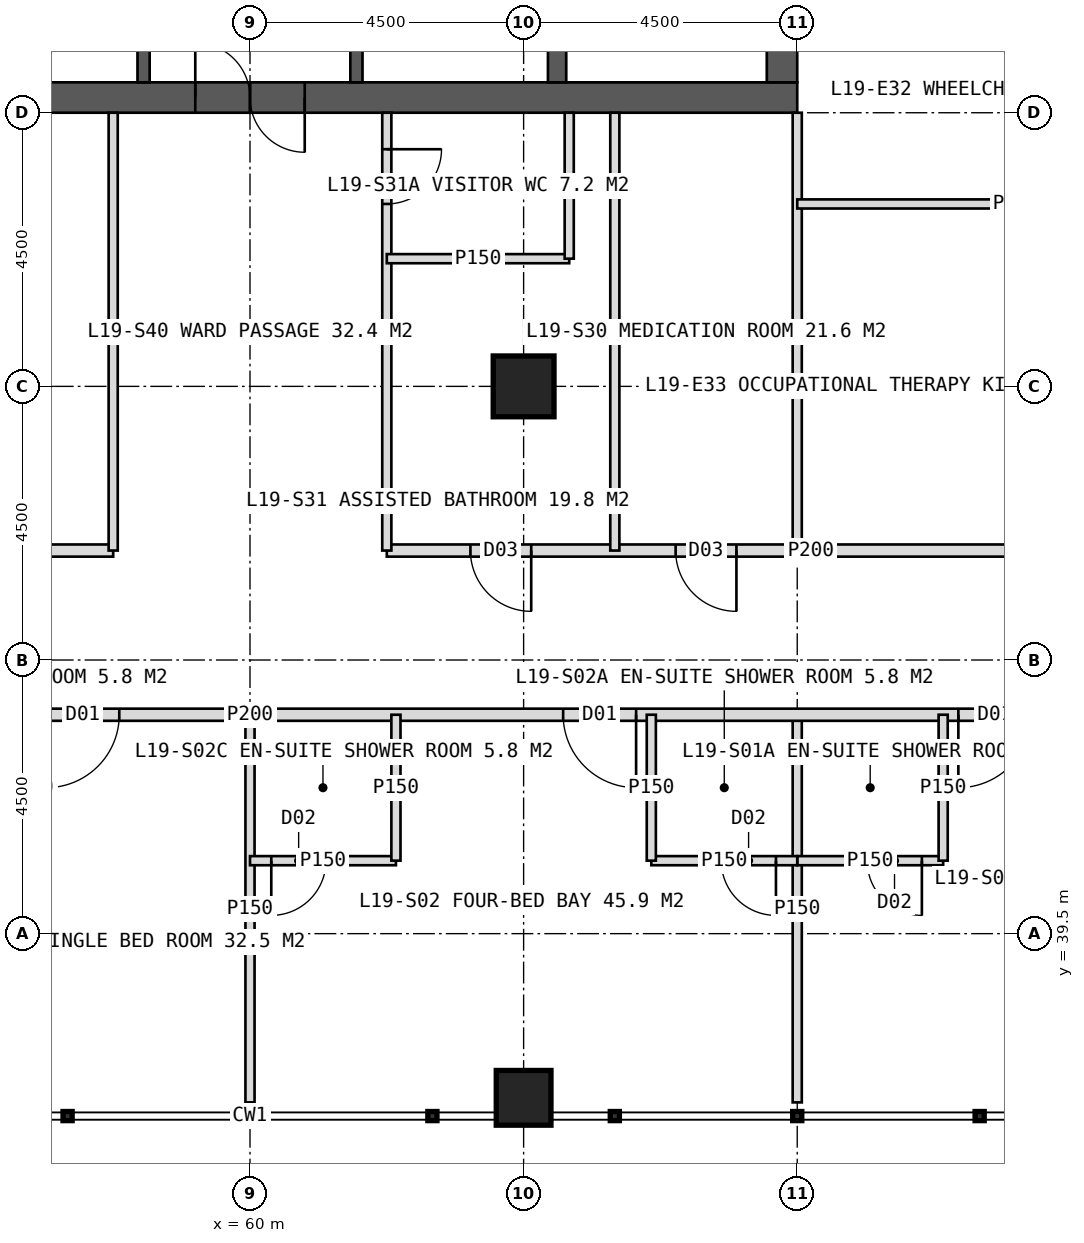
"""IFC4 building model, lengths in metres.
Left out: names, types, materials, properties, quantities, classifications, styles, units other than length and angle.
Written with IfcOpenShell. Run it as: python <this file> out.ifc"""

import sys

from ifc_helpers import new_model, si_unit, direction, frame, frame_2d, origin, origin_2d, place, context, subcontext, project, spatial, rectangle, hollow_rectangle, extrude, element, fill, save


model = new_model("IFC4")
c1 = context("Model", 3, precision=1e-05, world=origin(), true_north=direction((0.0, 1.0)))
c2 = subcontext(c1, "Body", "Model", "MODEL_VIEW")
j1 = project(units=[si_unit("LENGTHUNIT", "METRE"), si_unit("PLANEANGLEUNIT", "RADIAN")], contexts=[c1])
p1 = place(None, origin())
s1 = spatial("IfcSite", under=j1, at=p1, CompositionType="ELEMENT")
p2 = place(p1, origin())
s2 = spatial("IfcBuilding", under=s1, at=p2, CompositionType="ELEMENT")
p3 = place(p2, frame((0.0, 0.0, 83.0)))
s3 = spatial("IfcBuildingStorey", under=s2, at=p3, CompositionType="ELEMENT", Elevation=83.0)
p4 = place(p3, frame((51.0, 53.25, 0.0), z_axis=(0.0, 0.0, 1.0), x_axis=(1.0, 0.0, 0.0)))
e1 = element("IfcWall", 1, at=p4, inside=s3, PredefinedType="SHEAR", context=c2, shape_type="SweptSolid", body=[
    extrude(rectangle(XDim=18.0, YDim=0.5, at=frame_2d((9.0, 0.0))), origin(), (0.0, 0.0, 1.0), 4.0),
])
p5 = place(p4, frame((8.1, 0.0, 0.0)))
e2 = element("IfcOpeningElement", 2, at=p5, cuts=e1, PredefinedType="OPENING", context=c2, shape_type="SweptSolid", body=[
    extrude(rectangle(XDim=1.8, YDim=2.2, at=frame_2d((0.9, 1.1))), frame((0.0, 0.26, 0.0), z_axis=(0.0, -1.0, 0.0), x_axis=(1.0, 0.0, 0.0)), (0.0, 0.0, 1.0), 0.52),
])
p6 = place(p3, frame((68.75, 53.5, 0.0), z_axis=(0.0, 0.0, 1.0), x_axis=(0.0, 1.0, 0.0)))
e3 = element("IfcWall", 3, at=p6, inside=s3, PredefinedType="SHEAR", context=c2, shape_type="SweptSolid", body=[
    extrude(rectangle(XDim=17.0, YDim=0.5, at=frame_2d((8.5, 0.0))), origin(), (0.0, 0.0, 1.0), 4.0),
])
p7 = place(p6, frame((9.5, 0.0, 0.0)))
e4 = element("IfcOpeningElement", 4, at=p7, cuts=e3, PredefinedType="OPENING", context=c2, shape_type="SweptSolid", body=[
    extrude(rectangle(XDim=1.5, YDim=2.2, at=frame_2d((0.75, 1.1))), frame((0.0, 0.26, 0.0), z_axis=(0.0, -1.0, 0.0), x_axis=(1.0, 0.0, 0.0)), (0.0, 0.0, 1.0), 0.52),
])
p8 = place(p3, frame((65.05, 53.5, 0.0), z_axis=(0.0, 0.0, 1.0), x_axis=(0.0, 1.0, 0.0)))
e5 = element("IfcWall", 5, at=p8, inside=s3, PredefinedType="SHEAR", context=c2, shape_type="SweptSolid", body=[
    extrude(rectangle(XDim=17.0, YDim=0.3, at=frame_2d((8.5, 0.0))), origin(), (0.0, 0.0, 1.0), 4.0),
])
p9 = place(p3, frame((58.25, 53.5, 0.0), z_axis=(0.0, 0.0, 1.0), x_axis=(0.0, 1.0, 0.0)))
e6 = element("IfcWall", 6, at=p9, inside=s3, PredefinedType="SHEAR", context=c2, shape_type="SweptSolid", body=[
    extrude(rectangle(XDim=17.0, YDim=0.2, at=frame_2d((8.5, 0.0))), origin(), (0.0, 0.0, 1.0), 4.0),
])
p10 = place(p9, frame((1.375, 0.0, 0.0)))
e7 = element("IfcOpeningElement", 7, at=p10, cuts=e6, PredefinedType="OPENING", context=c2, shape_type="SweptSolid", body=[
    extrude(rectangle(XDim=1.4, YDim=2.2, at=frame_2d((0.7, 1.1))), frame((0.0, 0.11, 0.0), z_axis=(0.0, -1.0, 0.0), x_axis=(1.0, 0.0, 0.0)), (0.0, 0.0, 1.0), 0.22),
])
p11 = place(p9, frame((5.675, 0.0, 0.0)))
e8 = element("IfcOpeningElement", 8, at=p11, cuts=e6, PredefinedType="OPENING", context=c2, shape_type="SweptSolid", body=[
    extrude(rectangle(XDim=1.4, YDim=2.2, at=frame_2d((0.7, 1.1))), frame((0.0, 0.11, 0.0), z_axis=(0.0, -1.0, 0.0), x_axis=(1.0, 0.0, 0.0)), (0.0, 0.0, 1.0), 0.22),
])
p12 = place(p3, frame((61.75, 53.5, 0.0), z_axis=(0.0, 0.0, 1.0), x_axis=(0.0, 1.0, 0.0)))
e9 = element("IfcWall", 9, at=p12, inside=s3, PredefinedType="SHEAR", context=c2, shape_type="SweptSolid", body=[
    extrude(rectangle(XDim=17.0, YDim=0.2, at=frame_2d((8.5, 0.0))), origin(), (0.0, 0.0, 1.0), 4.0),
])
p13 = place(p12, frame((1.375, 0.0, 0.0)))
e10 = element("IfcOpeningElement", 10, at=p13, cuts=e9, PredefinedType="OPENING", context=c2, shape_type="SweptSolid", body=[
    extrude(rectangle(XDim=1.4, YDim=2.2, at=frame_2d((0.7, 1.1))), frame((0.0, 0.11, 0.0), z_axis=(0.0, -1.0, 0.0), x_axis=(1.0, 0.0, 0.0)), (0.0, 0.0, 1.0), 0.22),
])
p14 = place(p12, frame((5.675, 0.0, 0.0)))
e11 = element("IfcOpeningElement", 11, at=p14, cuts=e9, PredefinedType="OPENING", context=c2, shape_type="SweptSolid", body=[
    extrude(rectangle(XDim=1.4, YDim=2.2, at=frame_2d((0.7, 1.1))), frame((0.0, 0.11, 0.0), z_axis=(0.0, -1.0, 0.0), x_axis=(1.0, 0.0, 0.0)), (0.0, 0.0, 1.0), 0.22),
])
p15 = place(p3, frame((64.5, 48.5, 0.0), z_axis=(0.0, 0.0, 1.0), x_axis=(1.0, 0.0, 0.0)))
e12 = element("IfcColumn", 12, at=p15, inside=s3, PredefinedType="COLUMN", context=c2, shape_type="SweptSolid", body=[
    extrude(hollow_rectangle(XDim=1.0, YDim=1.0, WallThickness=0.1, at=origin_2d()), origin(), (0.0, 0.0, 1.0), 4.0),
])
p16 = place(p3, frame((64.5, 36.8, 0.0), z_axis=(0.0, 0.0, 1.0), x_axis=(1.0, 0.0, 0.0)))
e13 = element("IfcColumn", 13, at=p16, inside=s3, PredefinedType="COLUMN", context=c2, shape_type="SweptSolid", body=[
    extrude(hollow_rectangle(XDim=0.9, YDim=0.9, WallThickness=0.08, at=origin_2d()), origin(), (0.0, 0.0, 1.0), 4.0),
])
p17 = place(p3, frame((69.0, 43.1, 0.0), z_axis=(0.0, 0.0, 1.0), x_axis=(0.0, -1.0, 0.0)))
e14 = element("IfcWall", 14, at=p17, inside=s3, PredefinedType="PARTITIONING", context=c2, shape_type="SweptSolid", body=[
    extrude(rectangle(XDim=6.375, YDim=0.15, at=frame_2d((3.188, 0.0))), origin(), (0.0, 0.0, 1.0), 3.75),
])
p18 = place(p3, frame((60.0, 43.1, 0.0), z_axis=(0.0, 0.0, 1.0), x_axis=(0.0, -1.0, 0.0)))
e15 = element("IfcWall", 15, at=p18, inside=s3, PredefinedType="PARTITIONING", context=c2, shape_type="SweptSolid", body=[
    extrude(rectangle(XDim=6.375, YDim=0.15, at=frame_2d((3.188, 0.0))), origin(), (0.0, 0.0, 1.0), 2.75),
])
p19 = place(p3, frame((78.9, 43.1, 0.0), z_axis=(0.0, 0.0, 1.0), x_axis=(-1.0, 0.0, 0.0)))
e16 = element("IfcWall", 16, at=p19, inside=s3, PredefinedType="PARTITIONING", context=c2, shape_type="SweptSolid", body=[
    extrude(rectangle(XDim=37.8, YDim=0.2, at=frame_2d((18.9, 0.0))), origin(), (0.0, 0.0, 1.0), 3.75),
])
p20 = place(p19, frame((6.05, 0.0, 0.0)))
e17 = element("IfcOpeningElement", 17, at=p20, cuts=e16, PredefinedType="OPENING", context=c2, shape_type="SweptSolid", body=[
    extrude(rectangle(XDim=1.2, YDim=2.2, at=frame_2d((0.6, 1.1))), frame((0.0, 0.11, 0.0), z_axis=(0.0, -1.0, 0.0), x_axis=(1.0, 0.0, 0.0)), (0.0, 0.0, 1.0), 0.22),
])
p21 = place(p19, frame((12.55, 0.0, 0.0)))
e18 = element("IfcOpeningElement", 18, at=p21, cuts=e16, PredefinedType="OPENING", context=c2, shape_type="SweptSolid", body=[
    extrude(rectangle(XDim=1.2, YDim=2.2, at=frame_2d((0.6, 1.1))), frame((0.0, 0.11, 0.0), z_axis=(0.0, -1.0, 0.0), x_axis=(1.0, 0.0, 0.0)), (0.0, 0.0, 1.0), 0.22),
])
p22 = place(p19, frame((21.05, 0.0, 0.0)))
e19 = element("IfcOpeningElement", 19, at=p22, cuts=e16, PredefinedType="OPENING", context=c2, shape_type="SweptSolid", body=[
    extrude(rectangle(XDim=1.2, YDim=2.2, at=frame_2d((0.6, 1.1))), frame((0.0, 0.11, 0.0), z_axis=(0.0, -1.0, 0.0), x_axis=(1.0, 0.0, 0.0)), (0.0, 0.0, 1.0), 0.22),
])
p23 = place(p19, frame((27.55, 0.0, 0.0)))
e20 = element("IfcOpeningElement", 20, at=p23, cuts=e16, PredefinedType="OPENING", context=c2, shape_type="SweptSolid", body=[
    extrude(rectangle(XDim=1.2, YDim=2.2, at=frame_2d((0.6, 1.1))), frame((0.0, 0.11, 0.0), z_axis=(0.0, -1.0, 0.0), x_axis=(1.0, 0.0, 0.0)), (0.0, 0.0, 1.0), 0.22),
])
p24 = place(p3, frame((71.4, 40.7, 0.0), z_axis=(0.0, 0.0, 1.0), x_axis=(-1.0, 0.0, 0.0)))
e21 = element("IfcWall", 21, at=p24, inside=s3, PredefinedType="PARTITIONING", context=c2, shape_type="SweptSolid", body=[
    extrude(rectangle(XDim=2.4, YDim=0.15, at=frame_2d((1.2, 0.0))), origin(), (0.0, 0.0, 1.0), 3.75),
])
p25 = place(p24, frame((0.35, 0.0, 0.0)))
e22 = element("IfcOpeningElement", 22, at=p25, cuts=e21, PredefinedType="OPENING", context=c2, shape_type="SweptSolid", body=[
    extrude(rectangle(XDim=0.9, YDim=2.1, at=frame_2d((0.45, 1.05))), frame((0.0, 0.085, 0.0), z_axis=(0.0, -1.0, 0.0), x_axis=(1.0, 0.0, 0.0)), (0.0, 0.0, 1.0), 0.17),
])
p26 = place(p3, frame((71.4, 43.1, 0.0), z_axis=(0.0, 0.0, 1.0), x_axis=(0.0, -1.0, 0.0)))
e23 = element("IfcWall", 23, at=p26, inside=s3, PredefinedType="PARTITIONING", context=c2, shape_type="SweptSolid", body=[
    extrude(rectangle(XDim=2.4, YDim=0.15, at=frame_2d((1.2, 0.0))), origin(), (0.0, 0.0, 1.0), 3.75),
])
p27 = place(p3, frame((69.0, 40.7, 0.0), z_axis=(0.0, 0.0, 1.0), x_axis=(-1.0, 0.0, 0.0)))
e24 = element("IfcWall", 24, at=p27, inside=s3, PredefinedType="PARTITIONING", context=c2, shape_type="SweptSolid", body=[
    extrude(rectangle(XDim=2.4, YDim=0.15, at=frame_2d((1.2, 0.0))), origin(), (0.0, 0.0, 1.0), 3.75),
])
p28 = place(p27, frame((0.35, 0.0, 0.0)))
e25 = element("IfcOpeningElement", 25, at=p28, cuts=e24, PredefinedType="OPENING", context=c2, shape_type="SweptSolid", body=[
    extrude(rectangle(XDim=0.9, YDim=2.1, at=frame_2d((0.45, 1.05))), frame((0.0, 0.085, 0.0), z_axis=(0.0, -1.0, 0.0), x_axis=(1.0, 0.0, 0.0)), (0.0, 0.0, 1.0), 0.17),
])
p29 = place(p3, frame((66.6, 43.1, 0.0), z_axis=(0.0, 0.0, 1.0), x_axis=(0.0, -1.0, 0.0)))
e26 = element("IfcWall", 26, at=p29, inside=s3, PredefinedType="PARTITIONING", context=c2, shape_type="SweptSolid", body=[
    extrude(rectangle(XDim=2.4, YDim=0.15, at=frame_2d((1.2, 0.0))), origin(), (0.0, 0.0, 1.0), 3.75),
])
p30 = place(p3, frame((62.4, 40.7, 0.0), z_axis=(0.0, 0.0, 1.0), x_axis=(-1.0, 0.0, 0.0)))
e27 = element("IfcWall", 27, at=p30, inside=s3, PredefinedType="PARTITIONING", context=c2, shape_type="SweptSolid", body=[
    extrude(rectangle(XDim=2.4, YDim=0.15, at=frame_2d((1.2, 0.0))), origin(), (0.0, 0.0, 1.0), 3.75),
])
p31 = place(p30, frame((1.15, 0.0, 0.0)))
e28 = element("IfcOpeningElement", 28, at=p31, cuts=e27, PredefinedType="OPENING", context=c2, shape_type="SweptSolid", body=[
    extrude(rectangle(XDim=0.9, YDim=2.1, at=frame_2d((0.45, 1.05))), frame((0.0, 0.085, 0.0), z_axis=(0.0, -1.0, 0.0), x_axis=(1.0, 0.0, 0.0)), (0.0, 0.0, 1.0), 0.17),
])
p32 = place(p3, frame((62.4, 43.1, 0.0), z_axis=(0.0, 0.0, 1.0), x_axis=(0.0, -1.0, 0.0)))
e29 = element("IfcWall", 29, at=p32, inside=s3, PredefinedType="PARTITIONING", context=c2, shape_type="SweptSolid", body=[
    extrude(rectangle(XDim=2.4, YDim=0.15, at=frame_2d((1.2, 0.0))), origin(), (0.0, 0.0, 1.0), 3.75),
])
p33 = place(p3, frame((69.0, 53.0, 0.0), z_axis=(0.0, 0.0, 1.0), x_axis=(0.0, -1.0, 0.0)))
e30 = element("IfcWall", 30, at=p33, inside=s3, PredefinedType="PARTITIONING", context=c2, shape_type="SweptSolid", body=[
    extrude(rectangle(XDim=7.2, YDim=0.15, at=frame_2d((3.6, 0.0))), origin(), (0.0, 0.0, 1.0), 3.75),
])
p34 = place(p3, frame((76.2, 45.8, 0.0), z_axis=(0.0, 0.0, 1.0), x_axis=(-1.0, 0.0, 0.0)))
e31 = element("IfcWall", 31, at=p34, inside=s3, PredefinedType="PARTITIONING", context=c2, shape_type="SweptSolid", body=[
    extrude(rectangle(XDim=13.95, YDim=0.2, at=frame_2d((6.975, 0.0))), origin(), (0.0, 0.0, 1.0), 3.75),
])
p35 = place(p34, frame((8.2, 0.0, 0.0)))
e32 = element("IfcOpeningElement", 32, at=p35, cuts=e31, PredefinedType="OPENING", context=c2, shape_type="SweptSolid", body=[
    extrude(rectangle(XDim=1.0, YDim=2.1, at=frame_2d((0.5, 1.05))), frame((0.0, 0.11, 0.0), z_axis=(0.0, -1.0, 0.0), x_axis=(1.0, 0.0, 0.0)), (0.0, 0.0, 1.0), 0.22),
])
p36 = place(p34, frame((11.575, 0.0, 0.0)))
e33 = element("IfcOpeningElement", 33, at=p36, cuts=e31, PredefinedType="OPENING", context=c2, shape_type="SweptSolid", body=[
    extrude(rectangle(XDim=1.0, YDim=2.1, at=frame_2d((0.5, 1.05))), frame((0.0, 0.11, 0.0), z_axis=(0.0, -1.0, 0.0), x_axis=(1.0, 0.0, 0.0)), (0.0, 0.0, 1.0), 0.22),
])
p37 = place(p3, frame((57.75, 45.8, 0.0), z_axis=(0.0, 0.0, 1.0), x_axis=(-1.0, 0.0, 0.0)))
e34 = element("IfcWall", 34, at=p37, inside=s3, PredefinedType="PARTITIONING", context=c2, shape_type="SweptSolid", body=[
    extrude(rectangle(XDim=13.95, YDim=0.2, at=frame_2d((6.975, 0.0))), origin(), (0.0, 0.0, 1.0), 3.75),
])
p38 = place(p37, frame((3.625, 0.0, 0.0)))
e35 = element("IfcOpeningElement", 35, at=p38, cuts=e34, PredefinedType="OPENING", context=c2, shape_type="SweptSolid", body=[
    extrude(rectangle(XDim=1.0, YDim=2.1, at=frame_2d((0.5, 1.05))), frame((0.0, 0.11, 0.0), z_axis=(0.0, -1.0, 0.0), x_axis=(1.0, 0.0, 0.0)), (0.0, 0.0, 1.0), 0.22),
])
p39 = place(p37, frame((10.6, 0.0, 0.0)))
e36 = element("IfcOpeningElement", 36, at=p39, cuts=e34, PredefinedType="OPENING", context=c2, shape_type="SweptSolid", body=[
    extrude(rectangle(XDim=1.0, YDim=2.1, at=frame_2d((0.5, 1.05))), frame((0.0, 0.11, 0.0), z_axis=(0.0, -1.0, 0.0), x_axis=(1.0, 0.0, 0.0)), (0.0, 0.0, 1.0), 0.22),
])
p40 = place(p3, frame((62.25, 53.0, 0.0), z_axis=(0.0, 0.0, 1.0), x_axis=(0.0, -1.0, 0.0)))
e37 = element("IfcWall", 37, at=p40, inside=s3, PredefinedType="PARTITIONING", context=c2, shape_type="SweptSolid", body=[
    extrude(rectangle(XDim=7.2, YDim=0.15, at=frame_2d((3.6, 0.0))), origin(), (0.0, 0.0, 1.0), 3.75),
])
p41 = place(p40, frame((0.6, 0.0, 0.0)))
e38 = element("IfcOpeningElement", 38, at=p41, cuts=e37, PredefinedType="OPENING", context=c2, shape_type="SweptSolid", body=[
    extrude(rectangle(XDim=0.9, YDim=2.1, at=frame_2d((0.45, 1.05))), frame((0.0, 0.085, 0.0), z_axis=(0.0, -1.0, 0.0), x_axis=(1.0, 0.0, 0.0)), (0.0, 0.0, 1.0), 0.17),
])
for number, where, z_axis, x_axis in (
    (39, (57.75, 53.0, 0.0), (0.0, 0.0, 1.0), (0.0, -1.0, 0.0)),
    (40, (66.0, 53.0, 0.0), (0.0, 0.0, 1.0), (0.0, -1.0, 0.0)),
):
    element("IfcWall", number, at=place(p3, frame(where, z_axis=z_axis, x_axis=x_axis)), inside=s3, PredefinedType="PARTITIONING", context=c2, shape_type="SweptSolid", body=[
        extrude(rectangle(XDim=7.2, YDim=0.15, at=frame_2d((3.6, 0.0))), origin(), (0.0, 0.0, 1.0), 3.75),
    ])
p42 = place(p3, frame((65.25, 50.6, 0.0), z_axis=(0.0, 0.0, 1.0), x_axis=(-1.0, 0.0, 0.0)))
e41 = element("IfcWall", 41, at=p42, inside=s3, PredefinedType="PARTITIONING", context=c2, shape_type="SweptSolid", body=[
    extrude(rectangle(XDim=3.0, YDim=0.15, at=frame_2d((1.5, 0.0))), origin(), (0.0, 0.0, 1.0), 3.75),
])
p43 = place(p3, frame((65.25, 53.0, 0.0), z_axis=(0.0, 0.0, 1.0), x_axis=(0.0, -1.0, 0.0)))
e42 = element("IfcWall", 42, at=p43, inside=s3, PredefinedType="PARTITIONING", context=c2, shape_type="SweptSolid", body=[
    extrude(rectangle(XDim=2.4, YDim=0.15, at=frame_2d((1.2, 0.0))), origin(), (0.0, 0.0, 1.0), 3.75),
])
p44 = place(p3, frame((69.0, 51.5, 0.0), z_axis=(0.0, 0.0, 1.0), x_axis=(1.0, 0.0, 0.0)))
e43 = element("IfcWall", 43, at=p44, inside=s3, PredefinedType="PARTITIONING", context=c2, shape_type="SweptSolid", body=[
    extrude(rectangle(XDim=7.2, YDim=0.15, at=frame_2d((3.6, 0.0))), origin(), (0.0, 0.0, 1.0), 3.75),
])
p45 = place(p20, origin())
e44 = element("IfcDoor", 44, at=p45, inside=s3, OperationType="SINGLE_SWING_RIGHT", PredefinedType="DOOR", context=c2, shape_type="SweptSolid", body=[
    extrude(rectangle(XDim=1.2, YDim=2.2, at=frame_2d((0.6, 1.1))), frame((0.0, 0.025, 0.0), z_axis=(0.0, -1.0, 0.0), x_axis=(1.0, 0.0, 0.0)), (0.0, 0.0, 1.0), 0.05),
])
fill(e17, e44)
p46 = place(p25, origin())
e45 = element("IfcDoor", 45, at=p46, inside=s3, OperationType="SINGLE_SWING_LEFT", PredefinedType="DOOR", context=c2, shape_type="SweptSolid", body=[
    extrude(rectangle(XDim=0.9, YDim=2.1, at=frame_2d((0.45, 1.05))), frame((0.0, 0.025, 0.0), z_axis=(0.0, -1.0, 0.0), x_axis=(1.0, 0.0, 0.0)), (0.0, 0.0, 1.0), 0.05),
])
fill(e22, e45)
p47 = place(p21, origin())
e46 = element("IfcDoor", 46, at=p47, inside=s3, OperationType="SINGLE_SWING_LEFT", PredefinedType="DOOR", context=c2, shape_type="SweptSolid", body=[
    extrude(rectangle(XDim=1.2, YDim=2.2, at=frame_2d((0.6, 1.1))), frame((0.0, 0.025, 0.0), z_axis=(0.0, -1.0, 0.0), x_axis=(1.0, 0.0, 0.0)), (0.0, 0.0, 1.0), 0.05),
])
fill(e18, e46)
p48 = place(p28, origin())
e47 = element("IfcDoor", 47, at=p48, inside=s3, OperationType="SINGLE_SWING_LEFT", PredefinedType="DOOR", context=c2, shape_type="SweptSolid", body=[
    extrude(rectangle(XDim=0.9, YDim=2.1, at=frame_2d((0.45, 1.05))), frame((0.0, 0.025, 0.0), z_axis=(0.0, -1.0, 0.0), x_axis=(1.0, 0.0, 0.0)), (0.0, 0.0, 1.0), 0.05),
])
fill(e25, e47)
p49 = place(p31, origin())
e48 = element("IfcDoor", 48, at=p49, inside=s3, OperationType="SINGLE_SWING_RIGHT", PredefinedType="DOOR", context=c2, shape_type="SweptSolid", body=[
    extrude(rectangle(XDim=0.9, YDim=2.1, at=frame_2d((0.45, 1.05))), frame((0.0, 0.025, 0.0), z_axis=(0.0, -1.0, 0.0), x_axis=(1.0, 0.0, 0.0)), (0.0, 0.0, 1.0), 0.05),
])
fill(e28, e48)
p50 = place(p22, origin())
e49 = element("IfcDoor", 49, at=p50, inside=s3, OperationType="SINGLE_SWING_RIGHT", PredefinedType="DOOR", context=c2, shape_type="SweptSolid", body=[
    extrude(rectangle(XDim=1.2, YDim=2.2, at=frame_2d((0.6, 1.1))), frame((0.0, 0.025, 0.0), z_axis=(0.0, -1.0, 0.0), x_axis=(1.0, 0.0, 0.0)), (0.0, 0.0, 1.0), 0.05),
])
fill(e19, e49)
p51 = place(p35, origin())
e50 = element("IfcDoor", 50, at=p51, inside=s3, OperationType="SINGLE_SWING_LEFT", PredefinedType="DOOR", context=c2, shape_type="SweptSolid", body=[
    extrude(rectangle(XDim=1.0, YDim=2.1, at=frame_2d((0.5, 1.05))), frame((0.0, 0.025, 0.0), z_axis=(0.0, -1.0, 0.0), x_axis=(1.0, 0.0, 0.0)), (0.0, 0.0, 1.0), 0.05),
])
fill(e32, e50)
p52 = place(p41, origin())
e51 = element("IfcDoor", 51, at=p52, inside=s3, OperationType="SINGLE_SWING_LEFT", PredefinedType="DOOR", context=c2, shape_type="SweptSolid", body=[
    extrude(rectangle(XDim=0.9, YDim=2.1, at=frame_2d((0.45, 1.05))), frame((0.0, 0.025, 0.0), z_axis=(0.0, -1.0, 0.0), x_axis=(1.0, 0.0, 0.0)), (0.0, 0.0, 1.0), 0.05),
])
fill(e38, e51)
p53 = place(p36, origin())
e52 = element("IfcDoor", 52, at=p53, inside=s3, OperationType="SINGLE_SWING_LEFT", PredefinedType="DOOR", context=c2, shape_type="SweptSolid", body=[
    extrude(rectangle(XDim=1.0, YDim=2.1, at=frame_2d((0.5, 1.05))), frame((0.0, 0.025, 0.0), z_axis=(0.0, -1.0, 0.0), x_axis=(1.0, 0.0, 0.0)), (0.0, 0.0, 1.0), 0.05),
])
fill(e33, e52)
p54 = place(p5, origin())
e53 = element("IfcDoor", 53, at=p54, inside=s3, OperationType="DOUBLE_DOOR_SINGLE_SWING", PredefinedType="DOOR", context=c2, shape_type="SweptSolid", body=[
    extrude(rectangle(XDim=1.8, YDim=2.2, at=frame_2d((0.9, 1.1))), frame((0.0, 0.025, 0.0), z_axis=(0.0, -1.0, 0.0), x_axis=(1.0, 0.0, 0.0)), (0.0, 0.0, 1.0), 0.05),
])
fill(e2, e53)
save(model, sys.argv[1])
